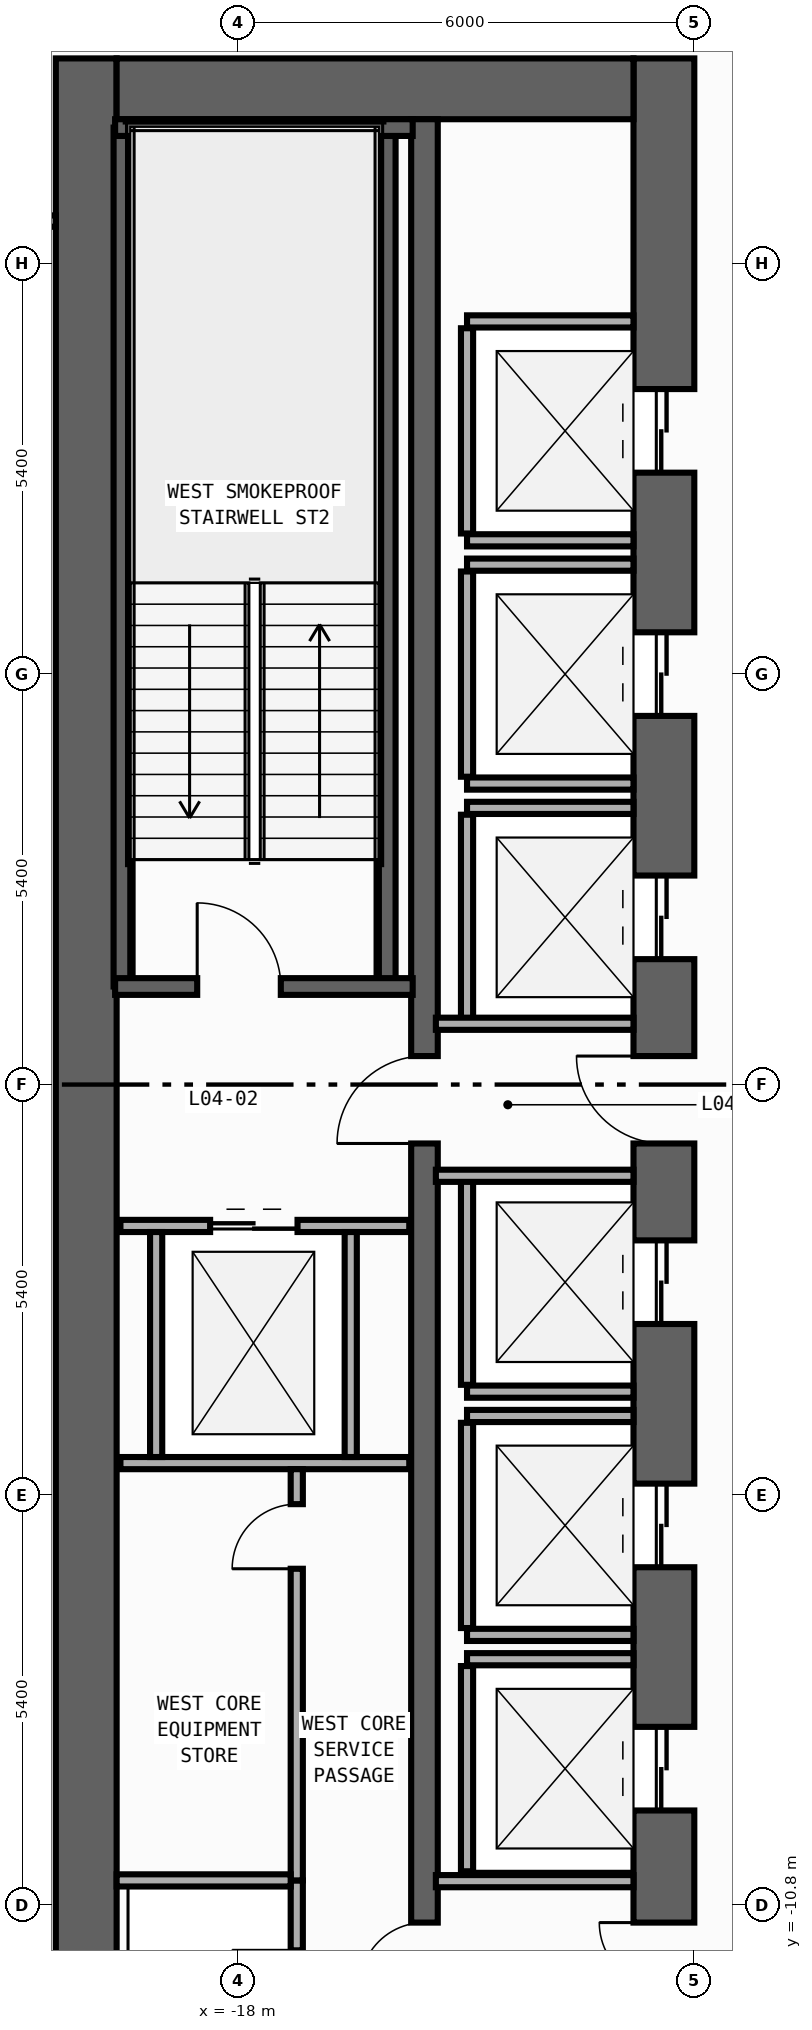
"""IFC4 building model, lengths in metres.
Left out: names, types, materials, properties, quantities, classifications, styles, units other than length and angle.
Written with IfcOpenShell. Run it as: python <this file> out.ifc"""

import sys

from ifc_helpers import new_model, si_unit, direction, frame, frame_2d, origin, place, context, subcontext, project, spatial, rectangle, extrude, element, fill, save


model = new_model("IFC4")
c1 = context("Model", 3, precision=1e-05, world=origin(), true_north=direction((0.0, 1.0)))
c2 = subcontext(c1, "Body", "Model", "MODEL_VIEW")
j1 = project(units=[si_unit("LENGTHUNIT", "METRE"), si_unit("PLANEANGLEUNIT", "RADIAN")], contexts=[c1])
p1 = place(None, origin())
s1 = spatial("IfcSite", under=j1, at=p1, CompositionType="ELEMENT")
p2 = place(p1, origin())
s2 = spatial("IfcBuilding", under=s1, at=p2, CompositionType="ELEMENT")
p3 = place(p2, frame((0.0, 0.0, 16.0)))
s3 = spatial("IfcBuildingStorey", under=s2, at=p3, CompositionType="ELEMENT", Elevation=16.0)
p4 = place(p3, frame((-20.0, -13.5, 0.0), z_axis=(0.0, 0.0, 1.0), x_axis=(0.0, 1.0, 0.0)))
e1 = element("IfcWall", 1, at=p4, inside=s3, PredefinedType="SHEAR", context=c2, shape_type="SweptSolid", body=[
    extrude(rectangle(XDim=27.0, YDim=0.8, at=frame_2d((13.5, 0.0))), origin(), (0.0, 0.0, 1.0), 4.55),
])
p5 = place(p3, frame((-12.4, -13.5, 0.0), z_axis=(0.0, 0.0, 1.0), x_axis=(0.0, 1.0, 0.0)))
e2 = element("IfcWall", 2, at=p5, inside=s3, PredefinedType="SHEAR", context=c2, shape_type="SweptSolid", body=[
    extrude(rectangle(XDim=27.0, YDim=0.8, at=frame_2d((13.5, 0.0))), origin(), (0.0, 0.0, 1.0), 4.55),
])
p6 = place(p5, frame((21.55, 0.0, 0.0)))
e3 = element("IfcOpeningElement", 3, at=p6, cuts=e2, PredefinedType="OPENING", context=c2, shape_type="SweptSolid", body=[
    extrude(rectangle(XDim=1.1, YDim=2.2, at=frame_2d((0.55, 1.1))), frame((0.0, 0.41, 0.0), z_axis=(0.0, -1.0, 0.0), x_axis=(1.0, 0.0, 0.0)), (0.0, 0.0, 1.0), 0.82),
])
p7 = place(p5, frame((18.35, 0.0, 0.0)))
e4 = element("IfcOpeningElement", 4, at=p7, cuts=e2, PredefinedType="OPENING", context=c2, shape_type="SweptSolid", body=[
    extrude(rectangle(XDim=1.1, YDim=2.2, at=frame_2d((0.55, 1.1))), frame((0.0, 0.41, 0.0), z_axis=(0.0, -1.0, 0.0), x_axis=(1.0, 0.0, 0.0)), (0.0, 0.0, 1.0), 0.82),
])
p8 = place(p5, frame((15.15, 0.0, 0.0)))
e5 = element("IfcOpeningElement", 5, at=p8, cuts=e2, PredefinedType="OPENING", context=c2, shape_type="SweptSolid", body=[
    extrude(rectangle(XDim=1.1, YDim=2.2, at=frame_2d((0.55, 1.1))), frame((0.0, 0.41, 0.0), z_axis=(0.0, -1.0, 0.0), x_axis=(1.0, 0.0, 0.0)), (0.0, 0.0, 1.0), 0.82),
])
p9 = place(p5, frame((10.35, 0.0, 0.0)))
e6 = element("IfcOpeningElement", 6, at=p9, cuts=e2, PredefinedType="OPENING", context=c2, shape_type="SweptSolid", body=[
    extrude(rectangle(XDim=1.1, YDim=2.2, at=frame_2d((0.55, 1.1))), frame((0.0, 0.41, 0.0), z_axis=(0.0, -1.0, 0.0), x_axis=(1.0, 0.0, 0.0)), (0.0, 0.0, 1.0), 0.82),
])
p10 = place(p5, frame((7.15, 0.0, 0.0)))
e7 = element("IfcOpeningElement", 7, at=p10, cuts=e2, PredefinedType="OPENING", context=c2, shape_type="SweptSolid", body=[
    extrude(rectangle(XDim=1.1, YDim=2.2, at=frame_2d((0.55, 1.1))), frame((0.0, 0.41, 0.0), z_axis=(0.0, -1.0, 0.0), x_axis=(1.0, 0.0, 0.0)), (0.0, 0.0, 1.0), 0.82),
])
p11 = place(p5, frame((3.95, 0.0, 0.0)))
e8 = element("IfcOpeningElement", 8, at=p11, cuts=e2, PredefinedType="OPENING", context=c2, shape_type="SweptSolid", body=[
    extrude(rectangle(XDim=1.1, YDim=2.2, at=frame_2d((0.55, 1.1))), frame((0.0, 0.41, 0.0), z_axis=(0.0, -1.0, 0.0), x_axis=(1.0, 0.0, 0.0)), (0.0, 0.0, 1.0), 0.82),
])
p12 = place(p5, frame((12.725, 0.0, 0.0)))
e9 = element("IfcOpeningElement", 9, at=p12, cuts=e2, PredefinedType="OPENING", context=c2, shape_type="SweptSolid", body=[
    extrude(rectangle(XDim=1.15, YDim=2.2, at=frame_2d((0.575, 1.1))), frame((0.0, 0.41, 0.0), z_axis=(0.0, -1.0, 0.0), x_axis=(1.0, 0.0, 0.0)), (0.0, 0.0, 1.0), 0.82),
])
p13 = place(p5, frame((1.625, 0.0, 0.0)))
e10 = element("IfcOpeningElement", 10, at=p13, cuts=e2, PredefinedType="OPENING", context=c2, shape_type="SweptSolid", body=[
    extrude(rectangle(XDim=0.85, YDim=2.1, at=frame_2d((0.425, 1.05))), frame((0.0, 0.41, 0.0), z_axis=(0.0, -1.0, 0.0), x_axis=(1.0, 0.0, 0.0)), (0.0, 0.0, 1.0), 0.82),
])
p14 = place(p3, frame((-19.6, 13.1, 0.0), z_axis=(0.0, 0.0, 1.0), x_axis=(1.0, 0.0, 0.0)))
e11 = element("IfcWall", 11, at=p14, inside=s3, PredefinedType="SHEAR", context=c2, shape_type="SweptSolid", body=[
    extrude(rectangle(XDim=6.8, YDim=0.8, at=frame_2d((3.4, 0.0))), origin(), (0.0, 0.0, 1.0), 4.55),
])
p15 = place(p3, frame((-15.55, -12.7, 0.0), z_axis=(0.0, 0.0, 1.0), x_axis=(0.0, 1.0, 0.0)))
e12 = element("IfcWall", 12, at=p15, inside=s3, PredefinedType="SHEAR", context=c2, shape_type="SweptSolid", body=[
    extrude(rectangle(XDim=25.4, YDim=0.35, at=frame_2d((12.7, 0.0))), origin(), (0.0, 0.0, 1.0), 4.55),
])
p16 = place(p15, frame((11.925, 0.0, 0.0)))
e13 = element("IfcOpeningElement", 13, at=p16, cuts=e12, PredefinedType="OPENING", context=c2, shape_type="SweptSolid", body=[
    extrude(rectangle(XDim=1.15, YDim=2.2, at=frame_2d((0.575, 1.1))), frame((0.0, 0.185, 0.0), z_axis=(0.0, -1.0, 0.0), x_axis=(1.0, 0.0, 0.0)), (0.0, 0.0, 1.0), 0.37),
])
p17 = place(p15, frame((0.825, 0.0, 0.0)))
e14 = element("IfcOpeningElement", 14, at=p17, cuts=e12, PredefinedType="OPENING", context=c2, shape_type="SweptSolid", body=[
    extrude(rectangle(XDim=0.85, YDim=2.1, at=frame_2d((0.425, 1.05))), frame((0.0, 0.185, 0.0), z_axis=(0.0, -1.0, 0.0), x_axis=(1.0, 0.0, 0.0)), (0.0, 0.0, 1.0), 0.37),
])
for number, where, z_axis, x_axis in (
    (15, (-16.04, 1.29, 0.0), (0.0, 0.0, 1.0), (0.0, 1.0, 0.0)),
    (16, (-19.53, 1.29, 0.0), (0.0, 0.0, 1.0), (0.0, 1.0, 0.0)),
):
    element("IfcWall", number, at=place(p3, frame(where, z_axis=z_axis, x_axis=x_axis)), inside=s3, PredefinedType="SHEAR", context=c2, shape_type="SweptSolid", body=[
        extrude(rectangle(XDim=11.3, YDim=0.22, at=frame_2d((5.65, 0.0))), origin(), (0.0, 0.0, 1.0), 4.55),
    ])
p18 = place(p3, frame((-19.62, 12.59, 0.0), z_axis=(0.0, 0.0, 1.0), x_axis=(1.0, 0.0, 0.0)))
e17 = element("IfcWall", 17, at=p18, inside=s3, PredefinedType="SHEAR", context=c2, shape_type="SweptSolid", body=[
    extrude(rectangle(XDim=3.915, YDim=0.22, at=frame_2d((1.958, 0.0))), origin(), (0.0, 0.0, 1.0), 4.55),
])
p19 = place(p3, frame((-19.62, 1.29, 0.0), z_axis=(0.0, 0.0, 1.0), x_axis=(1.0, 0.0, 0.0)))
e18 = element("IfcWall", 18, at=p19, inside=s3, PredefinedType="SHEAR", context=c2, shape_type="SweptSolid", body=[
    extrude(rectangle(XDim=3.915, YDim=0.22, at=frame_2d((1.958, 0.0))), origin(), (0.0, 0.0, 1.0), 4.55),
])
p20 = place(p19, frame((1.08, 0.0, 0.0)))
e19 = element("IfcOpeningElement", 19, at=p20, cuts=e18, PredefinedType="OPENING", context=c2, shape_type="SweptSolid", body=[
    extrude(rectangle(XDim=1.1, YDim=2.2, at=frame_2d((0.55, 1.1))), frame((0.0, 0.12, 0.0), z_axis=(0.0, -1.0, 0.0), x_axis=(1.0, 0.0, 0.0)), (0.0, 0.0, 1.0), 0.24),
])
for number, where, z_axis, x_axis in (
    (20, (-14.99, 7.16, 0.0), (0.0, 0.0, 1.0), (1.0, 0.0, 0.0)),
    (21, (-14.99, 10.04, 0.0), (0.0, 0.0, 1.0), (1.0, 0.0, 0.0)),
):
    element("IfcWall", number, at=place(p3, frame(where, z_axis=z_axis, x_axis=x_axis)), inside=s3, PredefinedType="STANDARD", context=c2, shape_type="SweptSolid", body=[
        extrude(rectangle(XDim=2.19, YDim=0.16, at=frame_2d((1.095, 0.0))), origin(), (0.0, 0.0, 1.0), 4.55),
    ])
p21 = place(p3, frame((-14.99, 7.25, 0.0), z_axis=(0.0, 0.0, 1.0), x_axis=(0.0, 1.0, 0.0)))
e22 = element("IfcWall", 22, at=p21, inside=s3, PredefinedType="STANDARD", context=c2, shape_type="SweptSolid", body=[
    extrude(rectangle(XDim=2.7, YDim=0.16, at=frame_2d((1.35, 0.0))), origin(), (0.0, 0.0, 1.0), 4.55),
])
for number, where, z_axis, x_axis in (
    (23, (-14.99, 3.96, 0.0), (0.0, 0.0, 1.0), (1.0, 0.0, 0.0)),
    (24, (-14.99, 6.84, 0.0), (0.0, 0.0, 1.0), (1.0, 0.0, 0.0)),
):
    element("IfcWall", number, at=place(p3, frame(where, z_axis=z_axis, x_axis=x_axis)), inside=s3, PredefinedType="STANDARD", context=c2, shape_type="SweptSolid", body=[
        extrude(rectangle(XDim=2.19, YDim=0.16, at=frame_2d((1.095, 0.0))), origin(), (0.0, 0.0, 1.0), 4.55),
    ])
p22 = place(p3, frame((-14.99, 4.05, 0.0), z_axis=(0.0, 0.0, 1.0), x_axis=(0.0, 1.0, 0.0)))
e25 = element("IfcWall", 25, at=p22, inside=s3, PredefinedType="STANDARD", context=c2, shape_type="SweptSolid", body=[
    extrude(rectangle(XDim=2.7, YDim=0.16, at=frame_2d((1.35, 0.0))), origin(), (0.0, 0.0, 1.0), 4.55),
])
p23 = place(p3, frame((-14.99, 3.64, 0.0), z_axis=(0.0, 0.0, 1.0), x_axis=(1.0, 0.0, 0.0)))
e26 = element("IfcWall", 26, at=p23, inside=s3, PredefinedType="STANDARD", context=c2, shape_type="SweptSolid", body=[
    extrude(rectangle(XDim=2.19, YDim=0.16, at=frame_2d((1.095, 0.0))), origin(), (0.0, 0.0, 1.0), 4.55),
])
p24 = place(p3, frame((-14.99, 0.85, 0.0), z_axis=(0.0, 0.0, 1.0), x_axis=(0.0, 1.0, 0.0)))
e27 = element("IfcWall", 27, at=p24, inside=s3, PredefinedType="STANDARD", context=c2, shape_type="SweptSolid", body=[
    extrude(rectangle(XDim=2.7, YDim=0.16, at=frame_2d((1.35, 0.0))), origin(), (0.0, 0.0, 1.0), 4.55),
])
p25 = place(p3, frame((-14.99, -4.04, 0.0), z_axis=(0.0, 0.0, 1.0), x_axis=(1.0, 0.0, 0.0)))
e28 = element("IfcWall", 28, at=p25, inside=s3, PredefinedType="STANDARD", context=c2, shape_type="SweptSolid", body=[
    extrude(rectangle(XDim=2.19, YDim=0.16, at=frame_2d((1.095, 0.0))), origin(), (0.0, 0.0, 1.0), 4.55),
])
p26 = place(p3, frame((-14.99, -3.95, 0.0), z_axis=(0.0, 0.0, 1.0), x_axis=(0.0, 1.0, 0.0)))
e29 = element("IfcWall", 29, at=p26, inside=s3, PredefinedType="STANDARD", context=c2, shape_type="SweptSolid", body=[
    extrude(rectangle(XDim=2.7, YDim=0.16, at=frame_2d((1.35, 0.0))), origin(), (0.0, 0.0, 1.0), 4.55),
])
for number, where, z_axis, x_axis in (
    (30, (-14.99, -7.24, 0.0), (0.0, 0.0, 1.0), (1.0, 0.0, 0.0)),
    (31, (-14.99, -4.36, 0.0), (0.0, 0.0, 1.0), (1.0, 0.0, 0.0)),
):
    element("IfcWall", number, at=place(p3, frame(where, z_axis=z_axis, x_axis=x_axis)), inside=s3, PredefinedType="STANDARD", context=c2, shape_type="SweptSolid", body=[
        extrude(rectangle(XDim=2.19, YDim=0.16, at=frame_2d((1.095, 0.0))), origin(), (0.0, 0.0, 1.0), 4.55),
    ])
p27 = place(p3, frame((-14.99, -7.15, 0.0), z_axis=(0.0, 0.0, 1.0), x_axis=(0.0, 1.0, 0.0)))
e32 = element("IfcWall", 32, at=p27, inside=s3, PredefinedType="STANDARD", context=c2, shape_type="SweptSolid", body=[
    extrude(rectangle(XDim=2.7, YDim=0.16, at=frame_2d((1.35, 0.0))), origin(), (0.0, 0.0, 1.0), 4.55),
])
p28 = place(p3, frame((-14.99, -7.56, 0.0), z_axis=(0.0, 0.0, 1.0), x_axis=(1.0, 0.0, 0.0)))
e33 = element("IfcWall", 33, at=p28, inside=s3, PredefinedType="STANDARD", context=c2, shape_type="SweptSolid", body=[
    extrude(rectangle(XDim=2.19, YDim=0.16, at=frame_2d((1.095, 0.0))), origin(), (0.0, 0.0, 1.0), 4.55),
])
p29 = place(p3, frame((-14.99, -10.35, 0.0), z_axis=(0.0, 0.0, 1.0), x_axis=(0.0, 1.0, 0.0)))
e34 = element("IfcWall", 34, at=p29, inside=s3, PredefinedType="STANDARD", context=c2, shape_type="SweptSolid", body=[
    extrude(rectangle(XDim=2.7, YDim=0.16, at=frame_2d((1.35, 0.0))), origin(), (0.0, 0.0, 1.0), 4.55),
])
p30 = place(p3, frame((-19.55, -1.86, 0.0), z_axis=(0.0, 0.0, 1.0), x_axis=(1.0, 0.0, 0.0)))
e35 = element("IfcWall", 35, at=p30, inside=s3, PredefinedType="STANDARD", context=c2, shape_type="SweptSolid", body=[
    extrude(rectangle(XDim=3.8, YDim=0.16, at=frame_2d((1.9, 0.0))), origin(), (0.0, 0.0, 1.0), 4.55),
])
p31 = place(p30, frame((1.18, 0.0, 0.0)))
e36 = element("IfcOpeningElement", 36, at=p31, cuts=e35, PredefinedType="OPENING", context=c2, shape_type="SweptSolid", body=[
    extrude(rectangle(XDim=1.15, YDim=2.2, at=frame_2d((0.575, 1.1))), frame((0.0, 0.09, 0.0), z_axis=(0.0, -1.0, 0.0), x_axis=(1.0, 0.0, 0.0)), (0.0, 0.0, 1.0), 0.18),
])
p32 = place(p3, frame((-19.55, -4.98, 0.0), z_axis=(0.0, 0.0, 1.0), x_axis=(1.0, 0.0, 0.0)))
e37 = element("IfcWall", 37, at=p32, inside=s3, PredefinedType="STANDARD", context=c2, shape_type="SweptSolid", body=[
    extrude(rectangle(XDim=3.8, YDim=0.16, at=frame_2d((1.9, 0.0))), origin(), (0.0, 0.0, 1.0), 4.55),
])
for number, where, z_axis, x_axis in (
    (38, (-19.08, -4.9, 0.0), (0.0, 0.0, 1.0), (0.0, 1.0, 0.0)),
    (39, (-16.52, -4.9, 0.0), (0.0, 0.0, 1.0), (0.0, 1.0, 0.0)),
):
    element("IfcWall", number, at=place(p3, frame(where, z_axis=z_axis, x_axis=x_axis)), inside=s3, PredefinedType="STANDARD", context=c2, shape_type="SweptSolid", body=[
        extrude(rectangle(XDim=2.96, YDim=0.16, at=frame_2d((1.48, 0.0))), origin(), (0.0, 0.0, 1.0), 4.55),
    ])
for number, where, z_axis, x_axis in (
    (40, (-15.4, 0.8, 0.0), (0.0, 0.0, 1.0), (1.0, 0.0, 0.0)),
    (41, (-15.4, -1.2, 0.0), (0.0, 0.0, 1.0), (1.0, 0.0, 0.0)),
    (42, (-15.4, -10.48, 0.0), (0.0, 0.0, 1.0), (1.0, 0.0, 0.0)),
):
    element("IfcWall", number, at=place(p3, frame(where, z_axis=z_axis, x_axis=x_axis)), inside=s3, PredefinedType="STANDARD", context=c2, shape_type="SweptSolid", body=[
        extrude(rectangle(XDim=2.6, YDim=0.16, at=frame_2d((1.3, 0.0))), origin(), (0.0, 0.0, 1.0), 4.55),
    ])
p33 = place(p3, frame((-17.23, -12.7, 0.0), z_axis=(0.0, 0.0, 1.0), x_axis=(0.0, 1.0, 0.0)))
e43 = element("IfcWall", 43, at=p33, inside=s3, PredefinedType="PARTITIONING", context=c2, shape_type="SweptSolid", body=[
    extrude(rectangle(XDim=2.23, YDim=0.16, at=frame_2d((1.115, 0.0))), origin(), (0.0, 0.0, 1.0), 4.55),
])
p34 = place(p33, frame((0.46, 0.0, 0.0)))
e44 = element("IfcOpeningElement", 44, at=p34, cuts=e43, PredefinedType="OPENING", context=c2, shape_type="SweptSolid", body=[
    extrude(rectangle(XDim=0.85, YDim=2.1, at=frame_2d((0.425, 1.05))), frame((0.0, 0.09, 0.0), z_axis=(0.0, -1.0, 0.0), x_axis=(1.0, 0.0, 0.0)), (0.0, 0.0, 1.0), 0.18),
])
p35 = place(p3, frame((-17.23, -10.47, 0.0), z_axis=(0.0, 0.0, 1.0), x_axis=(0.0, 1.0, 0.0)))
e45 = element("IfcWall", 45, at=p35, inside=s3, PredefinedType="PARTITIONING", context=c2, shape_type="SweptSolid", body=[
    extrude(rectangle(XDim=5.41, YDim=0.16, at=frame_2d((2.705, 0.0))), origin(), (0.0, 0.0, 1.0), 4.55),
])
p36 = place(p35, frame((4.1, 0.0, 0.0)))
e46 = element("IfcOpeningElement", 46, at=p36, cuts=e45, PredefinedType="OPENING", context=c2, shape_type="SweptSolid", body=[
    extrude(rectangle(XDim=0.85, YDim=2.1, at=frame_2d((0.425, 1.05))), frame((0.0, 0.09, 0.0), z_axis=(0.0, -1.0, 0.0), x_axis=(1.0, 0.0, 0.0)), (0.0, 0.0, 1.0), 0.18),
])
p37 = place(p3, frame((-19.6, -10.47, 0.0), z_axis=(0.0, 0.0, 1.0), x_axis=(1.0, 0.0, 0.0)))
e47 = element("IfcWall", 47, at=p37, inside=s3, PredefinedType="PARTITIONING", context=c2, shape_type="SweptSolid", body=[
    extrude(rectangle(XDim=2.29, YDim=0.16, at=frame_2d((1.145, 0.0))), origin(), (0.0, 0.0, 1.0), 4.55),
])
p38 = place(p3, frame((-24.445, 11.36, 0.0), z_axis=(0.0, 0.0, 1.0), x_axis=(1.0, 0.0, 0.0)))
e48 = element("IfcWall", 48, at=p38, inside=s3, PredefinedType="PARTITIONING", context=c2, shape_type="SweptSolid", body=[
    extrude(rectangle(XDim=4.045, YDim=0.15, at=frame_2d((2.022, 0.0))), origin(), (0.0, 0.0, 1.0), 4.55),
])
p39 = place(p20, origin())
e49 = element("IfcDoor", 49, at=p39, inside=s3, OperationType="SINGLE_SWING_LEFT", PredefinedType="DOOR", context=c2, shape_type="SweptSolid", body=[
    extrude(rectangle(XDim=1.1, YDim=2.2, at=frame_2d((0.55, 1.1))), frame((0.0, 0.025, 0.0), z_axis=(0.0, -1.0, 0.0), x_axis=(1.0, 0.0, 0.0)), (0.0, 0.0, 1.0), 0.05),
])
fill(e19, e49)
p40 = place(p6, origin())
e50 = element("IfcDoor", 50, at=p40, inside=s3, OperationType="DOUBLE_DOOR_SLIDING", PredefinedType="DOOR", context=c2, shape_type="SweptSolid", body=[
    extrude(rectangle(XDim=1.1, YDim=2.2, at=frame_2d((0.55, 1.1))), frame((0.0, 0.025, 0.0), z_axis=(0.0, -1.0, 0.0), x_axis=(1.0, 0.0, 0.0)), (0.0, 0.0, 1.0), 0.05),
])
fill(e3, e50)
p41 = place(p7, origin())
e51 = element("IfcDoor", 51, at=p41, inside=s3, OperationType="DOUBLE_DOOR_SLIDING", PredefinedType="DOOR", context=c2, shape_type="SweptSolid", body=[
    extrude(rectangle(XDim=1.1, YDim=2.2, at=frame_2d((0.55, 1.1))), frame((0.0, 0.025, 0.0), z_axis=(0.0, -1.0, 0.0), x_axis=(1.0, 0.0, 0.0)), (0.0, 0.0, 1.0), 0.05),
])
fill(e4, e51)
p42 = place(p8, origin())
e52 = element("IfcDoor", 52, at=p42, inside=s3, OperationType="DOUBLE_DOOR_SLIDING", PredefinedType="DOOR", context=c2, shape_type="SweptSolid", body=[
    extrude(rectangle(XDim=1.1, YDim=2.2, at=frame_2d((0.55, 1.1))), frame((0.0, 0.025, 0.0), z_axis=(0.0, -1.0, 0.0), x_axis=(1.0, 0.0, 0.0)), (0.0, 0.0, 1.0), 0.05),
])
fill(e5, e52)
p43 = place(p9, origin())
e53 = element("IfcDoor", 53, at=p43, inside=s3, OperationType="DOUBLE_DOOR_SLIDING", PredefinedType="DOOR", context=c2, shape_type="SweptSolid", body=[
    extrude(rectangle(XDim=1.1, YDim=2.2, at=frame_2d((0.55, 1.1))), frame((0.0, 0.025, 0.0), z_axis=(0.0, -1.0, 0.0), x_axis=(1.0, 0.0, 0.0)), (0.0, 0.0, 1.0), 0.05),
])
fill(e6, e53)
p44 = place(p10, origin())
e54 = element("IfcDoor", 54, at=p44, inside=s3, OperationType="DOUBLE_DOOR_SLIDING", PredefinedType="DOOR", context=c2, shape_type="SweptSolid", body=[
    extrude(rectangle(XDim=1.1, YDim=2.2, at=frame_2d((0.55, 1.1))), frame((0.0, 0.025, 0.0), z_axis=(0.0, -1.0, 0.0), x_axis=(1.0, 0.0, 0.0)), (0.0, 0.0, 1.0), 0.05),
])
fill(e7, e54)
p45 = place(p11, origin())
e55 = element("IfcDoor", 55, at=p45, inside=s3, OperationType="DOUBLE_DOOR_SLIDING", PredefinedType="DOOR", context=c2, shape_type="SweptSolid", body=[
    extrude(rectangle(XDim=1.1, YDim=2.2, at=frame_2d((0.55, 1.1))), frame((0.0, 0.025, 0.0), z_axis=(0.0, -1.0, 0.0), x_axis=(1.0, 0.0, 0.0)), (0.0, 0.0, 1.0), 0.05),
])
fill(e8, e55)
p46 = place(p12, origin())
e56 = element("IfcDoor", 56, at=p46, inside=s3, OperationType="SINGLE_SWING_RIGHT", PredefinedType="DOOR", context=c2, shape_type="SweptSolid", body=[
    extrude(rectangle(XDim=1.15, YDim=2.2, at=frame_2d((0.575, 1.1))), frame((0.0, 0.025, 0.0), z_axis=(0.0, -1.0, 0.0), x_axis=(1.0, 0.0, 0.0)), (0.0, 0.0, 1.0), 0.05),
])
fill(e9, e56)
p47 = place(p16, origin())
e57 = element("IfcDoor", 57, at=p47, inside=s3, OperationType="SINGLE_SWING_LEFT", PredefinedType="DOOR", context=c2, shape_type="SweptSolid", body=[
    extrude(rectangle(XDim=1.15, YDim=2.2, at=frame_2d((0.575, 1.1))), frame((0.0, 0.025, 0.0), z_axis=(0.0, -1.0, 0.0), x_axis=(1.0, 0.0, 0.0)), (0.0, 0.0, 1.0), 0.05),
])
fill(e13, e57)
p48 = place(p13, origin())
e58 = element("IfcDoor", 58, at=p48, inside=s3, OperationType="SINGLE_SWING_RIGHT", PredefinedType="DOOR", context=c2, shape_type="SweptSolid", body=[
    extrude(rectangle(XDim=0.85, YDim=2.1, at=frame_2d((0.425, 1.05))), frame((0.0, 0.025, 0.0), z_axis=(0.0, -1.0, 0.0), x_axis=(1.0, 0.0, 0.0)), (0.0, 0.0, 1.0), 0.05),
])
fill(e10, e58)
p49 = place(p17, origin())
e59 = element("IfcDoor", 59, at=p49, inside=s3, OperationType="SINGLE_SWING_LEFT", PredefinedType="DOOR", context=c2, shape_type="SweptSolid", body=[
    extrude(rectangle(XDim=0.85, YDim=2.1, at=frame_2d((0.425, 1.05))), frame((0.0, 0.025, 0.0), z_axis=(0.0, -1.0, 0.0), x_axis=(1.0, 0.0, 0.0)), (0.0, 0.0, 1.0), 0.05),
])
fill(e14, e59)
p50 = place(p31, origin())
e60 = element("IfcDoor", 60, at=p50, inside=s3, OperationType="DOUBLE_DOOR_SLIDING", PredefinedType="DOOR", context=c2, shape_type="SweptSolid", body=[
    extrude(rectangle(XDim=1.15, YDim=2.2, at=frame_2d((0.575, 1.1))), frame((0.0, 0.025, 0.0), z_axis=(0.0, -1.0, 0.0), x_axis=(1.0, 0.0, 0.0)), (0.0, 0.0, 1.0), 0.05),
])
fill(e36, e60)
p51 = place(p36, origin())
e61 = element("IfcDoor", 61, at=p51, inside=s3, OperationType="SINGLE_SWING_LEFT", PredefinedType="DOOR", context=c2, shape_type="SweptSolid", body=[
    extrude(rectangle(XDim=0.85, YDim=2.1, at=frame_2d((0.425, 1.05))), frame((0.0, 0.025, 0.0), z_axis=(0.0, -1.0, 0.0), x_axis=(1.0, 0.0, 0.0)), (0.0, 0.0, 1.0), 0.05),
])
fill(e46, e61)
save(model, sys.argv[1])
